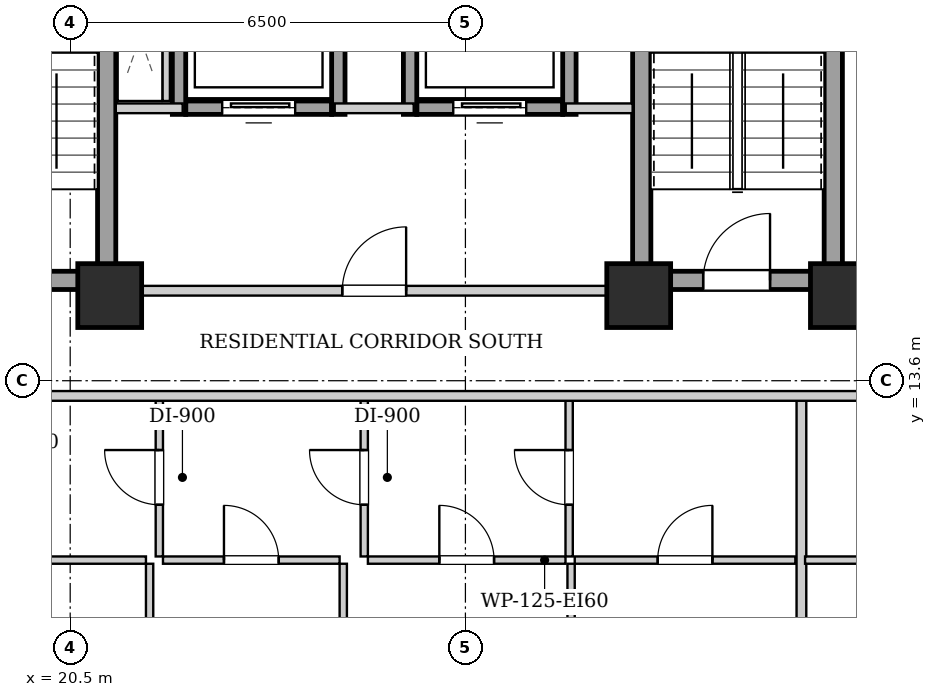
"""IFC4 building model, lengths in metres.
Left out: names, types, materials, properties, quantities, classifications, styles, units other than length and angle.
Written with IfcOpenShell. Run it as: python <this file> out.ifc"""

import sys

from ifc_helpers import new_model, si_unit, direction, frame, frame_2d, origin, origin_2d, place, context, subcontext, project, spatial, rectangle, extrude, element, fill, save


model = new_model("IFC4")
c1 = context("Model", 3, precision=1e-05, world=origin(), true_north=direction((0.0, 1.0)))
c2 = subcontext(c1, "Body", "Model", "MODEL_VIEW")
j1 = project(units=[si_unit("LENGTHUNIT", "METRE"), si_unit("PLANEANGLEUNIT", "RADIAN")], contexts=[c1])
p1 = place(None, origin())
s1 = spatial("IfcSite", under=j1, at=p1, CompositionType="ELEMENT")
p2 = place(p1, origin())
s2 = spatial("IfcBuilding", under=s1, at=p2, CompositionType="ELEMENT")
p3 = place(p2, frame((0.0, 0.0, 78.3)))
s3 = spatial("IfcBuildingStorey", under=s2, at=p3, CompositionType="ELEMENT", Elevation=78.3)
for number, where, z_axis, x_axis in (
    (1, (21.15, 15.0, 0.0), (0.0, 0.0, 1.0), (1.0, 0.0, 0.0)),
    (2, (29.85, 15.0, 0.0), (0.0, 0.0, 1.0), (1.0, 0.0, 0.0)),
    (3, (33.2, 15.0, 0.0), (0.0, 0.0, 1.0), (1.0, 0.0, 0.0)),
):
    element("IfcColumn", number, at=place(p3, frame(where, z_axis=z_axis, x_axis=x_axis)), inside=s3, PredefinedType="COLUMN", context=c2, shape_type="SweptSolid", body=[
        extrude(rectangle(XDim=1.05, YDim=1.05, at=origin_2d()), origin(), (0.0, 0.0, 1.0), 3.2),
    ])
p4 = place(p3, frame((21.1, 15.1, 0.0), z_axis=(0.0, 0.0, 1.0), x_axis=(0.0, 1.0, 0.0)))
e4 = element("IfcWall", 4, at=p4, inside=s3, PredefinedType="SHEAR", context=c2, shape_type="SweptSolid", body=[
    extrude(rectangle(XDim=9.0, YDim=0.3, at=frame_2d((4.5, 0.0))), origin(), (0.0, 0.0, 1.0), 2.94),
])
p5 = place(p3, frame((18.1, 15.25, 0.0), z_axis=(0.0, 0.0, 1.0), x_axis=(1.0, 0.0, 0.0)))
e5 = element("IfcWall", 5, at=p5, inside=s3, PredefinedType="SHEAR", context=c2, shape_type="SweptSolid", body=[
    extrude(rectangle(XDim=2.85, YDim=0.3, at=frame_2d((1.425, 0.0))), origin(), (0.0, 0.0, 1.0), 2.94),
])
p6 = place(p5, frame((0.86, 0.0, 0.0)))
e6 = element("IfcOpeningElement", 6, at=p6, cuts=e5, PredefinedType="OPENING", context=c2, shape_type="SweptSolid", body=[
    extrude(rectangle(XDim=1.1, YDim=2.05, at=frame_2d((0.55, 1.025))), frame((0.0, 0.16, 0.0), z_axis=(0.0, -1.0, 0.0), x_axis=(1.0, 0.0, 0.0)), (0.0, 0.0, 1.0), 0.32),
])
for number, where, z_axis, x_axis in (
    (7, (29.9, 15.1, 0.0), (0.0, 0.0, 1.0), (0.0, 1.0, 0.0)),
    (8, (33.05, 15.1, 0.0), (0.0, 0.0, 1.0), (0.0, 1.0, 0.0)),
):
    element("IfcWall", number, at=place(p3, frame(where, z_axis=z_axis, x_axis=x_axis)), inside=s3, PredefinedType="SHEAR", context=c2, shape_type="SweptSolid", body=[
        extrude(rectangle(XDim=9.0, YDim=0.3, at=frame_2d((4.5, 0.0))), origin(), (0.0, 0.0, 1.0), 2.94),
    ])
p7 = place(p3, frame((30.05, 15.25, 0.0), z_axis=(0.0, 0.0, 1.0), x_axis=(1.0, 0.0, 0.0)))
e9 = element("IfcWall", 9, at=p7, inside=s3, PredefinedType="SHEAR", context=c2, shape_type="SweptSolid", body=[
    extrude(rectangle(XDim=2.85, YDim=0.3, at=frame_2d((1.425, 0.0))), origin(), (0.0, 0.0, 1.0), 2.94),
])
p8 = place(p7, frame((0.86, 0.0, 0.0)))
e10 = element("IfcOpeningElement", 10, at=p8, cuts=e9, PredefinedType="OPENING", context=c2, shape_type="SweptSolid", body=[
    extrude(rectangle(XDim=1.1, YDim=2.05, at=frame_2d((0.55, 1.025))), frame((0.0, 0.16, 0.0), z_axis=(0.0, -1.0, 0.0), x_axis=(1.0, 0.0, 0.0)), (0.0, 0.0, 1.0), 0.32),
])
p9 = place(p3, frame((22.4, 18.09, 0.0), z_axis=(0.0, 0.0, 1.0), x_axis=(1.0, 0.0, 0.0)))
e11 = element("IfcWall", 11, at=p9, inside=s3, PredefinedType="SHEAR", context=c2, shape_type="SweptSolid", body=[
    extrude(rectangle(XDim=2.4, YDim=0.22, at=frame_2d((1.2, 0.0))), origin(), (0.0, 0.0, 1.0), 2.94),
])
p10 = place(p9, frame((0.6, 0.0, 0.0)))
e12 = element("IfcOpeningElement", 12, at=p10, cuts=e11, PredefinedType="OPENING", context=c2, shape_type="SweptSolid", body=[
    extrude(rectangle(XDim=1.2, YDim=2.15, at=frame_2d((0.6, 1.075))), frame((0.0, 0.12, 0.0), z_axis=(0.0, -1.0, 0.0), x_axis=(1.0, 0.0, 0.0)), (0.0, 0.0, 1.0), 0.24),
])
for number, where, z_axis, x_axis in (
    (13, (22.29, 17.98, 0.0), (0.0, 0.0, 1.0), (0.0, 1.0, 0.0)),
    (14, (24.91, 17.98, 0.0), (0.0, 0.0, 1.0), (0.0, 1.0, 0.0)),
):
    element("IfcWall", number, at=place(p3, frame(where, z_axis=z_axis, x_axis=x_axis)), inside=s3, PredefinedType="SHEAR", context=c2, shape_type="SweptSolid", body=[
        extrude(rectangle(XDim=2.54, YDim=0.22, at=frame_2d((1.27, 0.0))), origin(), (0.0, 0.0, 1.0), 2.94),
    ])
p11 = place(p3, frame((26.2, 18.09, 0.0), z_axis=(0.0, 0.0, 1.0), x_axis=(1.0, 0.0, 0.0)))
e15 = element("IfcWall", 15, at=p11, inside=s3, PredefinedType="SHEAR", context=c2, shape_type="SweptSolid", body=[
    extrude(rectangle(XDim=2.4, YDim=0.22, at=frame_2d((1.2, 0.0))), origin(), (0.0, 0.0, 1.0), 2.94),
])
p12 = place(p11, frame((0.6, 0.0, 0.0)))
e16 = element("IfcOpeningElement", 16, at=p12, cuts=e15, PredefinedType="OPENING", context=c2, shape_type="SweptSolid", body=[
    extrude(rectangle(XDim=1.2, YDim=2.15, at=frame_2d((0.6, 1.075))), frame((0.0, 0.12, 0.0), z_axis=(0.0, -1.0, 0.0), x_axis=(1.0, 0.0, 0.0)), (0.0, 0.0, 1.0), 0.24),
])
for number, where, z_axis, x_axis in (
    (17, (26.09, 17.98, 0.0), (0.0, 0.0, 1.0), (0.0, 1.0, 0.0)),
    (18, (28.71, 17.98, 0.0), (0.0, 0.0, 1.0), (0.0, 1.0, 0.0)),
):
    element("IfcWall", number, at=place(p3, frame(where, z_axis=z_axis, x_axis=x_axis)), inside=s3, PredefinedType="SHEAR", context=c2, shape_type="SweptSolid", body=[
        extrude(rectangle(XDim=2.54, YDim=0.22, at=frame_2d((1.27, 0.0))), origin(), (0.0, 0.0, 1.0), 2.94),
    ])
p13 = place(p3, frame((21.25, 15.08, 0.0), z_axis=(0.0, 0.0, 1.0), x_axis=(1.0, 0.0, 0.0)))
e19 = element("IfcWall", 19, at=p13, inside=s3, PredefinedType="PARTITIONING", context=c2, shape_type="SweptSolid", body=[
    extrude(rectangle(XDim=8.5, YDim=0.16, at=frame_2d((4.25, 0.0))), origin(), (0.0, 0.0, 1.0), 2.309),
])
p14 = place(p13, frame((3.725, 0.0, 0.0)))
e20 = element("IfcOpeningElement", 20, at=p14, cuts=e19, PredefinedType="OPENING", context=c2, shape_type="SweptSolid", body=[
    extrude(rectangle(XDim=1.05, YDim=2.05, at=frame_2d((0.525, 1.025))), frame((0.0, 0.09, 0.0), z_axis=(0.0, -1.0, 0.0), x_axis=(1.0, 0.0, 0.0)), (0.0, 0.0, 1.0), 0.18),
])
p15 = place(p3, frame((21.25, 18.08, 0.0), z_axis=(0.0, 0.0, 1.0), x_axis=(1.0, 0.0, 0.0)))
e21 = element("IfcWall", 21, at=p15, inside=s3, PredefinedType="PARTITIONING", context=c2, shape_type="SweptSolid", body=[
    extrude(rectangle(XDim=1.1, YDim=0.16, at=frame_2d((0.55, 0.0))), origin(), (0.0, 0.0, 1.0), 2.94),
])
p16 = place(p3, frame((24.85, 18.08, 0.0), z_axis=(0.0, 0.0, 1.0), x_axis=(1.0, 0.0, 0.0)))
e22 = element("IfcWall", 22, at=p16, inside=s3, PredefinedType="PARTITIONING", context=c2, shape_type="SweptSolid", body=[
    extrude(rectangle(XDim=1.3, YDim=0.16, at=frame_2d((0.65, 0.0))), origin(), (0.0, 0.0, 1.0), 2.94),
])
p17 = place(p3, frame((28.65, 18.08, 0.0), z_axis=(0.0, 0.0, 1.0), x_axis=(1.0, 0.0, 0.0)))
e23 = element("IfcWall", 23, at=p17, inside=s3, PredefinedType="PARTITIONING", context=c2, shape_type="SweptSolid", body=[
    extrude(rectangle(XDim=1.1, YDim=0.16, at=frame_2d((0.55, 0.0))), origin(), (0.0, 0.0, 1.0), 2.94),
])
p18 = place(p3, frame((22.08, 18.2, 0.0), z_axis=(0.0, 0.0, 1.0), x_axis=(0.0, 1.0, 0.0)))
e24 = element("IfcWall", 24, at=p18, inside=s3, PredefinedType="PARTITIONING", context=c2, shape_type="SweptSolid", body=[
    extrude(rectangle(XDim=2.12, YDim=0.12, at=frame_2d((1.06, 0.0))), origin(), (0.0, 0.0, 1.0), 2.94),
])
p19 = place(p3, frame((21.966, 10.71, 0.0), z_axis=(0.0, 0.0, 1.0), x_axis=(0.0, 1.0, 0.0)))
e25 = element("IfcWall", 25, at=p19, inside=s3, PredefinedType="PARTITIONING", context=c2, shape_type="SweptSolid", body=[
    extrude(rectangle(XDim=2.6, YDim=0.12, at=frame_2d((1.3, 0.0))), origin(), (0.0, 0.0, 1.0), 2.94),
])
p20 = place(p19, frame((0.85, 0.0, 0.0)))
e26 = element("IfcOpeningElement", 26, at=p20, cuts=e25, PredefinedType="OPENING", context=c2, shape_type="SweptSolid", body=[
    extrude(rectangle(XDim=0.9, YDim=2.05, at=frame_2d((0.45, 1.025))), frame((0.0, 0.07, 0.0), z_axis=(0.0, -1.0, 0.0), x_axis=(1.0, 0.0, 0.0)), (0.0, 0.0, 1.0), 0.14),
])
p21 = place(p3, frame((17.466, 10.65, 0.0), z_axis=(0.0, 0.0, 1.0), x_axis=(1.0, 0.0, 0.0)))
e27 = element("IfcWall", 27, at=p21, inside=s3, PredefinedType="PARTITIONING", context=c2, shape_type="SweptSolid", body=[
    extrude(rectangle(XDim=4.28, YDim=0.12, at=frame_2d((2.14, 0.0))), origin(), (0.0, 0.0, 1.0), 2.94),
])
p22 = place(p21, frame((1.69, 0.0, 0.0)))
e28 = element("IfcOpeningElement", 28, at=p22, cuts=e27, PredefinedType="OPENING", context=c2, shape_type="SweptSolid", body=[
    extrude(rectangle(XDim=0.9, YDim=2.05, at=frame_2d((0.45, 1.025))), frame((0.0, 0.07, 0.0), z_axis=(0.0, -1.0, 0.0), x_axis=(1.0, 0.0, 0.0)), (0.0, 0.0, 1.0), 0.14),
])
p23 = place(p3, frame((25.336, 10.71, 0.0), z_axis=(0.0, 0.0, 1.0), x_axis=(0.0, 1.0, 0.0)))
e29 = element("IfcWall", 29, at=p23, inside=s3, PredefinedType="PARTITIONING", context=c2, shape_type="SweptSolid", body=[
    extrude(rectangle(XDim=2.6, YDim=0.12, at=frame_2d((1.3, 0.0))), origin(), (0.0, 0.0, 1.0), 2.94),
])
p24 = place(p23, frame((0.85, 0.0, 0.0)))
e30 = element("IfcOpeningElement", 30, at=p24, cuts=e29, PredefinedType="OPENING", context=c2, shape_type="SweptSolid", body=[
    extrude(rectangle(XDim=0.9, YDim=2.05, at=frame_2d((0.45, 1.025))), frame((0.0, 0.07, 0.0), z_axis=(0.0, -1.0, 0.0), x_axis=(1.0, 0.0, 0.0)), (0.0, 0.0, 1.0), 0.14),
])
p25 = place(p3, frame((22.026, 10.65, 0.0), z_axis=(0.0, 0.0, 1.0), x_axis=(1.0, 0.0, 0.0)))
e31 = element("IfcWall", 31, at=p25, inside=s3, PredefinedType="PARTITIONING", context=c2, shape_type="SweptSolid", body=[
    extrude(rectangle(XDim=2.905, YDim=0.12, at=frame_2d((1.453, 0.0))), origin(), (0.0, 0.0, 1.0), 2.94),
])
p26 = place(p25, frame((1.003, 0.0, 0.0)))
e32 = element("IfcOpeningElement", 32, at=p26, cuts=e31, PredefinedType="OPENING", context=c2, shape_type="SweptSolid", body=[
    extrude(rectangle(XDim=0.9, YDim=2.05, at=frame_2d((0.45, 1.025))), frame((0.0, 0.07, 0.0), z_axis=(0.0, -1.0, 0.0), x_axis=(1.0, 0.0, 0.0)), (0.0, 0.0, 1.0), 0.14),
])
p27 = place(p3, frame((28.706, 10.71, 0.0), z_axis=(0.0, 0.0, 1.0), x_axis=(0.0, 1.0, 0.0)))
e33 = element("IfcWall", 33, at=p27, inside=s3, PredefinedType="PARTITIONING", context=c2, shape_type="SweptSolid", body=[
    extrude(rectangle(XDim=2.6, YDim=0.12, at=frame_2d((1.3, 0.0))), origin(), (0.0, 0.0, 1.0), 2.94),
])
p28 = place(p27, frame((0.85, 0.0, 0.0)))
e34 = element("IfcOpeningElement", 34, at=p28, cuts=e33, PredefinedType="OPENING", context=c2, shape_type="SweptSolid", body=[
    extrude(rectangle(XDim=0.9, YDim=2.05, at=frame_2d((0.45, 1.025))), frame((0.0, 0.07, 0.0), z_axis=(0.0, -1.0, 0.0), x_axis=(1.0, 0.0, 0.0)), (0.0, 0.0, 1.0), 0.14),
])
p29 = place(p3, frame((25.396, 10.65, 0.0), z_axis=(0.0, 0.0, 1.0), x_axis=(1.0, 0.0, 0.0)))
e35 = element("IfcWall", 35, at=p29, inside=s3, PredefinedType="PARTITIONING", context=c2, shape_type="SweptSolid", body=[
    extrude(rectangle(XDim=3.25, YDim=0.12, at=frame_2d((1.625, 0.0))), origin(), (0.0, 0.0, 1.0), 2.94),
])
p30 = place(p29, frame((1.175, 0.0, 0.0)))
e36 = element("IfcOpeningElement", 36, at=p30, cuts=e35, PredefinedType="OPENING", context=c2, shape_type="SweptSolid", body=[
    extrude(rectangle(XDim=0.9, YDim=2.05, at=frame_2d((0.45, 1.025))), frame((0.0, 0.07, 0.0), z_axis=(0.0, -1.0, 0.0), x_axis=(1.0, 0.0, 0.0)), (0.0, 0.0, 1.0), 0.14),
])
p31 = place(p3, frame((28.798, 10.65, 0.0), z_axis=(0.0, 0.0, 1.0), x_axis=(1.0, 0.0, 0.0)))
e37 = element("IfcWall", 37, at=p31, inside=s3, PredefinedType="PARTITIONING", context=c2, shape_type="SweptSolid", body=[
    extrude(rectangle(XDim=3.628, YDim=0.12, at=frame_2d((1.814, 0.0))), origin(), (0.0, 0.0, 1.0), 2.94),
])
p32 = place(p31, frame((1.364, 0.0, 0.0)))
e38 = element("IfcOpeningElement", 38, at=p32, cuts=e37, PredefinedType="OPENING", context=c2, shape_type="SweptSolid", body=[
    extrude(rectangle(XDim=0.9, YDim=2.05, at=frame_2d((0.45, 1.025))), frame((0.0, 0.07, 0.0), z_axis=(0.0, -1.0, 0.0), x_axis=(1.0, 0.0, 0.0)), (0.0, 0.0, 1.0), 0.14),
])
p33 = place(p3, frame((21.806, 0.28, 0.0), z_axis=(0.0, 0.0, 1.0), x_axis=(0.0, 1.0, 0.0)))
e39 = element("IfcWall", 39, at=p33, inside=s3, PredefinedType="PARTITIONING", context=c2, shape_type="SweptSolid", body=[
    extrude(rectangle(XDim=10.31, YDim=0.12, at=frame_2d((5.155, 0.0))), origin(), (0.0, 0.0, 1.0), 2.94),
])
p34 = place(p33, frame((4.69, 0.0, 0.0)))
e40 = element("IfcOpeningElement", 40, at=p34, cuts=e39, PredefinedType="OPENING", context=c2, shape_type="SweptSolid", body=[
    extrude(rectangle(XDim=0.9, YDim=2.05, at=frame_2d((0.45, 1.025))), frame((0.0, 0.07, 0.0), z_axis=(0.0, -1.0, 0.0), x_axis=(1.0, 0.0, 0.0)), (0.0, 0.0, 1.0), 0.14),
])
p35 = place(p3, frame((24.991, 0.28, 0.0), z_axis=(0.0, 0.0, 1.0), x_axis=(0.0, 1.0, 0.0)))
e41 = element("IfcWall", 41, at=p35, inside=s3, PredefinedType="PARTITIONING", context=c2, shape_type="SweptSolid", body=[
    extrude(rectangle(XDim=10.31, YDim=0.12, at=frame_2d((5.155, 0.0))), origin(), (0.0, 0.0, 1.0), 2.94),
])
p36 = place(p35, frame((4.69, 0.0, 0.0)))
e42 = element("IfcOpeningElement", 42, at=p36, cuts=e41, PredefinedType="OPENING", context=c2, shape_type="SweptSolid", body=[
    extrude(rectangle(XDim=0.9, YDim=2.05, at=frame_2d((0.45, 1.025))), frame((0.0, 0.07, 0.0), z_axis=(0.0, -1.0, 0.0), x_axis=(1.0, 0.0, 0.0)), (0.0, 0.0, 1.0), 0.14),
])
p37 = place(p3, frame((28.738, 0.28, 0.0), z_axis=(0.0, 0.0, 1.0), x_axis=(0.0, 1.0, 0.0)))
e43 = element("IfcWall", 43, at=p37, inside=s3, PredefinedType="PARTITIONING", context=c2, shape_type="SweptSolid", body=[
    extrude(rectangle(XDim=10.31, YDim=0.12, at=frame_2d((5.155, 0.0))), origin(), (0.0, 0.0, 1.0), 2.94),
])
p38 = place(p37, frame((4.69, 0.0, 0.0)))
e44 = element("IfcOpeningElement", 44, at=p38, cuts=e43, PredefinedType="OPENING", context=c2, shape_type="SweptSolid", body=[
    extrude(rectangle(XDim=0.9, YDim=2.05, at=frame_2d((0.45, 1.025))), frame((0.0, 0.07, 0.0), z_axis=(0.0, -1.0, 0.0), x_axis=(1.0, 0.0, 0.0)), (0.0, 0.0, 1.0), 0.14),
])
p39 = place(p3, frame((32.526, 0.28, 0.0), z_axis=(0.0, 0.0, 1.0), x_axis=(0.0, 1.0, 0.0)))
e45 = element("IfcWall", 45, at=p39, inside=s3, PredefinedType="PARTITIONING", context=c2, shape_type="SweptSolid", body=[
    extrude(rectangle(XDim=13.03, YDim=0.16, at=frame_2d((6.515, 0.0))), origin(), (0.0, 0.0, 1.0), 2.94),
])
p40 = place(p3, frame((32.586, 10.65, 0.0), z_axis=(0.0, 0.0, 1.0), x_axis=(1.0, 0.0, 0.0)))
e46 = element("IfcWall", 46, at=p40, inside=s3, PredefinedType="PARTITIONING", context=c2, shape_type="SweptSolid", body=[
    extrude(rectangle(XDim=2.4, YDim=0.12, at=frame_2d((1.2, 0.0))), origin(), (0.0, 0.0, 1.0), 2.94),
])
p41 = place(p3, frame((10.05, 13.35, 0.0), z_axis=(0.0, 0.0, 1.0), x_axis=(1.0, 0.0, 0.0)))
e47 = element("IfcWall", 47, at=p41, inside=s3, PredefinedType="PARTITIONING", context=c2, shape_type="SweptSolid", body=[
    extrude(rectangle(XDim=30.8, YDim=0.16, at=frame_2d((15.4, 0.0))), origin(), (0.0, 0.0, 1.0), 2.94),
])
p42 = place(p41, frame((2.893, 0.0, 0.0)))
e48 = element("IfcOpeningElement", 48, at=p42, cuts=e47, PredefinedType="OPENING", context=c2, shape_type="SweptSolid", body=[
    extrude(rectangle(XDim=0.95, YDim=2.1, at=frame_2d((0.475, 1.05))), frame((0.0, 0.09, 0.0), z_axis=(0.0, -1.0, 0.0), x_axis=(1.0, 0.0, 0.0)), (0.0, 0.0, 1.0), 0.18),
])
p43 = place(p41, frame((9.161, 0.0, 0.0)))
e49 = element("IfcOpeningElement", 49, at=p43, cuts=e47, PredefinedType="OPENING", context=c2, shape_type="SweptSolid", body=[
    extrude(rectangle(XDim=0.95, YDim=2.1, at=frame_2d((0.475, 1.05))), frame((0.0, 0.09, 0.0), z_axis=(0.0, -1.0, 0.0), x_axis=(1.0, 0.0, 0.0)), (0.0, 0.0, 1.0), 0.18),
])
p44 = place(p41, frame((26.306, 0.0, 0.0)))
e50 = element("IfcOpeningElement", 50, at=p44, cuts=e47, PredefinedType="OPENING", context=c2, shape_type="SweptSolid", body=[
    extrude(rectangle(XDim=0.95, YDim=2.1, at=frame_2d((0.475, 1.05))), frame((0.0, 0.09, 0.0), z_axis=(0.0, -1.0, 0.0), x_axis=(1.0, 0.0, 0.0)), (0.0, 0.0, 1.0), 0.18),
])
p45 = place(p8, origin())
e51 = element("IfcDoor", 51, at=p45, inside=s3, OperationType="SINGLE_SWING_RIGHT", PredefinedType="DOOR", context=c2, shape_type="SweptSolid", body=[
    extrude(rectangle(XDim=1.1, YDim=2.05, at=frame_2d((0.55, 1.025))), frame((0.0, 0.025, 0.0), z_axis=(0.0, -1.0, 0.0), x_axis=(1.0, 0.0, 0.0)), (0.0, 0.0, 1.0), 0.05),
])
fill(e10, e51)
p46 = place(p10, origin())
e52 = element("IfcDoor", 52, at=p46, inside=s3, OperationType="SLIDING_TO_LEFT", PredefinedType="DOOR", context=c2, shape_type="SweptSolid", body=[
    extrude(rectangle(XDim=1.2, YDim=2.15, at=frame_2d((0.6, 1.075))), frame((0.0, 0.025, 0.0), z_axis=(0.0, -1.0, 0.0), x_axis=(1.0, 0.0, 0.0)), (0.0, 0.0, 1.0), 0.05),
])
fill(e12, e52)
p47 = place(p12, origin())
e53 = element("IfcDoor", 53, at=p47, inside=s3, OperationType="SLIDING_TO_LEFT", PredefinedType="DOOR", context=c2, shape_type="SweptSolid", body=[
    extrude(rectangle(XDim=1.2, YDim=2.15, at=frame_2d((0.6, 1.075))), frame((0.0, 0.025, 0.0), z_axis=(0.0, -1.0, 0.0), x_axis=(1.0, 0.0, 0.0)), (0.0, 0.0, 1.0), 0.05),
])
fill(e16, e53)
p48 = place(p14, origin())
e54 = element("IfcDoor", 54, at=p48, inside=s3, OperationType="SINGLE_SWING_RIGHT", PredefinedType="DOOR", context=c2, shape_type="SweptSolid", body=[
    extrude(rectangle(XDim=1.05, YDim=2.05, at=frame_2d((0.525, 1.025))), frame((0.0, 0.025, 0.0), z_axis=(0.0, -1.0, 0.0), x_axis=(1.0, 0.0, 0.0)), (0.0, 0.0, 1.0), 0.05),
])
fill(e20, e54)
p49 = place(p20, origin())
e55 = element("IfcDoor", 55, at=p49, inside=s3, OperationType="SINGLE_SWING_RIGHT", PredefinedType="DOOR", context=c2, shape_type="SweptSolid", body=[
    extrude(rectangle(XDim=0.9, YDim=2.05, at=frame_2d((0.45, 1.025))), frame((0.0, 0.025, 0.0), z_axis=(0.0, -1.0, 0.0), x_axis=(1.0, 0.0, 0.0)), (0.0, 0.0, 1.0), 0.05),
])
fill(e26, e55)
p50 = place(p24, origin())
e56 = element("IfcDoor", 56, at=p50, inside=s3, OperationType="SINGLE_SWING_RIGHT", PredefinedType="DOOR", context=c2, shape_type="SweptSolid", body=[
    extrude(rectangle(XDim=0.9, YDim=2.05, at=frame_2d((0.45, 1.025))), frame((0.0, 0.025, 0.0), z_axis=(0.0, -1.0, 0.0), x_axis=(1.0, 0.0, 0.0)), (0.0, 0.0, 1.0), 0.05),
])
fill(e30, e56)
p51 = place(p26, origin())
e57 = element("IfcDoor", 57, at=p51, inside=s3, OperationType="SINGLE_SWING_LEFT", PredefinedType="DOOR", context=c2, shape_type="SweptSolid", body=[
    extrude(rectangle(XDim=0.9, YDim=2.05, at=frame_2d((0.45, 1.025))), frame((0.0, 0.025, 0.0), z_axis=(0.0, -1.0, 0.0), x_axis=(1.0, 0.0, 0.0)), (0.0, 0.0, 1.0), 0.05),
])
fill(e32, e57)
p52 = place(p28, origin())
e58 = element("IfcDoor", 58, at=p52, inside=s3, OperationType="SINGLE_SWING_RIGHT", PredefinedType="DOOR", context=c2, shape_type="SweptSolid", body=[
    extrude(rectangle(XDim=0.9, YDim=2.05, at=frame_2d((0.45, 1.025))), frame((0.0, 0.025, 0.0), z_axis=(0.0, -1.0, 0.0), x_axis=(1.0, 0.0, 0.0)), (0.0, 0.0, 1.0), 0.05),
])
fill(e34, e58)
p53 = place(p30, origin())
e59 = element("IfcDoor", 59, at=p53, inside=s3, OperationType="SINGLE_SWING_LEFT", PredefinedType="DOOR", context=c2, shape_type="SweptSolid", body=[
    extrude(rectangle(XDim=0.9, YDim=2.05, at=frame_2d((0.45, 1.025))), frame((0.0, 0.025, 0.0), z_axis=(0.0, -1.0, 0.0), x_axis=(1.0, 0.0, 0.0)), (0.0, 0.0, 1.0), 0.05),
])
fill(e36, e59)
p54 = place(p32, origin())
e60 = element("IfcDoor", 60, at=p54, inside=s3, OperationType="SINGLE_SWING_RIGHT", PredefinedType="DOOR", context=c2, shape_type="SweptSolid", body=[
    extrude(rectangle(XDim=0.9, YDim=2.05, at=frame_2d((0.45, 1.025))), frame((0.0, 0.025, 0.0), z_axis=(0.0, -1.0, 0.0), x_axis=(1.0, 0.0, 0.0)), (0.0, 0.0, 1.0), 0.05),
])
fill(e38, e60)
save(model, sys.argv[1])
